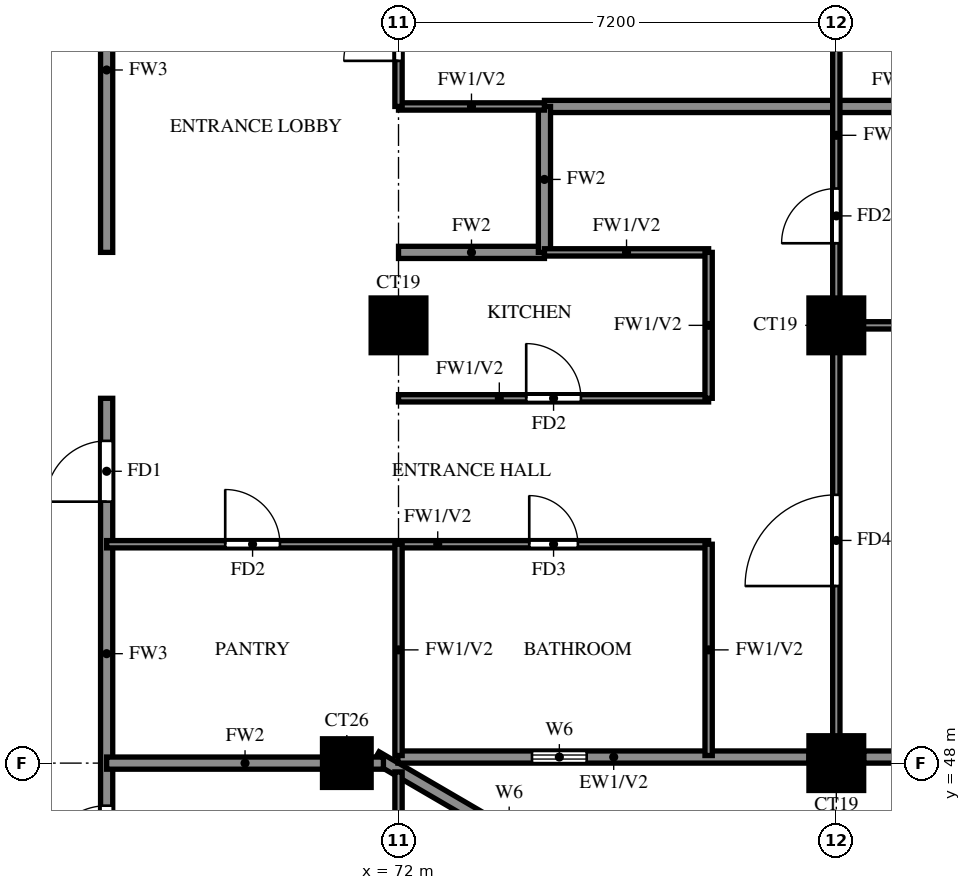
"""IFC4 building model, lengths in metres.
Left out: names, types, materials, properties, quantities, classifications, styles, units other than length and angle.
Written with IfcOpenShell. Run it as: python <this file> out.ifc"""

import sys

from ifc_helpers import new_model, si_unit, direction, frame, frame_2d, origin, origin_2d, place, context, subcontext, project, spatial, rectangle, extrude, source, transform, mapped, element, fill, save


model = new_model("IFC4")
c1 = context("Model", 3, precision=1e-05, world=origin(), true_north=direction((0.0, 1.0)))
c2 = subcontext(c1, "Body", "Model", "MODEL_VIEW")
j1 = project(units=[si_unit("LENGTHUNIT", "METRE"), si_unit("PLANEANGLEUNIT", "RADIAN")], contexts=[c1])
p1 = place(None, origin())
s1 = spatial("IfcSite", under=j1, at=p1, CompositionType="ELEMENT")
p2 = place(p1, origin())
s2 = spatial("IfcBuilding", under=s1, at=p2, CompositionType="ELEMENT")
p3 = place(p2, frame((0.0, 0.0, 178.0)))
s3 = spatial("IfcBuildingStorey", under=s2, at=p3, CompositionType="ELEMENT", Elevation=178.0)
m1 = source(origin(), c2, "Body", "SweptSolid", [
    extrude(rectangle(XDim=0.8, YDim=0.8, at=origin_2d()), origin(), (0.0, 0.0, 1.0), 3.2),
])
p4 = place(p3, frame((71.15, 48.0, 0.0), z_axis=(0.0, 0.0, 1.0), x_axis=(1.0, 0.0, 0.0)))
e1 = element("IfcColumn", 1, at=p4, inside=s3, PredefinedType="COLUMN", context=c2, shape_type="MappedRepresentation", body=[
    mapped(m1, transform((0.0, 0.0, 0.0))),
])
m2 = source(origin(), c2, "Body", "SweptSolid", [
    extrude(rectangle(XDim=0.9, YDim=0.9, at=origin_2d()), origin(), (0.0, 0.0, 1.0), 3.2),
])
for number, where, z_axis, x_axis in (
    (2, (79.2, 48.0, 0.0), (0.0, 0.0, 1.0), (1.0, 0.0, 0.0)),
    (3, (72.0, 55.2, 0.0), (0.0, 0.0, 1.0), (1.0, 0.0, 0.0)),
    (4, (79.2, 55.2, 0.0), (0.0, 0.0, 1.0), (1.0, 0.0, 0.0)),
):
    element("IfcColumn", number, at=place(p3, frame(where, z_axis=z_axis, x_axis=x_axis)), inside=s3, PredefinedType="COLUMN", context=c2, shape_type="MappedRepresentation", body=[
        mapped(m2, transform((0.0, 0.0, 0.0))),
    ])
p5 = place(p3, frame((85.719, 39.881, 0.0), z_axis=(0.0, 0.0, 1.0), x_axis=(-0.86377618652, 0.503875678716, 0.0)))
e5 = element("IfcWall", 5, at=p5, inside=s3, PredefinedType="SOLIDWALL", context=c2, shape_type="SweptSolid", body=[
    extrude(rectangle(XDim=16.311, YDim=0.2, at=frame_2d((8.156, 0.0))), origin(), (0.0, 0.0, 1.0), 3.2),
])
p6 = place(p5, frame((13.326, 0.0, 1.5)))
e6 = element("IfcOpeningElement", 6, at=p6, cuts=e5, PredefinedType="OPENING", context=c2, shape_type="SweptSolid", body=[
    extrude(rectangle(XDim=0.9, YDim=0.9, at=frame_2d((0.45, 0.45))), frame((0.0, 0.11, 0.0), z_axis=(0.0, -1.0, 0.0), x_axis=(1.0, 0.0, 0.0)), (0.0, 0.0, 1.0), 0.22),
])
p7 = place(p3, frame((71.99, 48.1, 0.0), z_axis=(0.0, 0.0, 1.0), x_axis=(1.0, 0.0, 0.0)))
e7 = element("IfcWall", 7, at=p7, inside=s3, PredefinedType="SOLIDWALL", context=c2, shape_type="SweptSolid", body=[
    extrude(rectangle(XDim=6.76, YDim=0.2, at=frame_2d((3.38, 0.0))), origin(), (0.0, 0.0, 1.0), 3.2),
])
p8 = place(p7, frame((2.205, 0.0, 1.5)))
e8 = element("IfcOpeningElement", 8, at=p8, cuts=e7, PredefinedType="OPENING", context=c2, shape_type="SweptSolid", body=[
    extrude(rectangle(XDim=0.9, YDim=0.9, at=frame_2d((0.45, 0.45))), frame((0.0, 0.11, 0.0), z_axis=(0.0, -1.0, 0.0), x_axis=(1.0, 0.0, 0.0)), (0.0, 0.0, 1.0), 0.22),
])
p9 = place(p3, frame((79.65, 48.1, 0.0), z_axis=(0.0, 0.0, 1.0), x_axis=(1.0, 0.0, 0.0)))
e9 = element("IfcWall", 9, at=p9, inside=s3, PredefinedType="SOLIDWALL", context=c2, shape_type="SweptSolid", body=[
    extrude(rectangle(XDim=5.75, YDim=0.2, at=frame_2d((2.875, 0.0))), origin(), (0.0, 0.0, 1.0), 3.2),
])
p10 = place(p9, frame((1.675, 0.0, 0.6)))
e10 = element("IfcOpeningElement", 10, at=p10, cuts=e9, PredefinedType="OPENING", context=c2, shape_type="SweptSolid", body=[
    extrude(rectangle(XDim=2.4, YDim=2.4, at=frame_2d((1.2, 1.2))), frame((0.0, 0.11, 0.0), z_axis=(0.0, -1.0, 0.0), x_axis=(1.0, 0.0, 0.0)), (0.0, 0.0, 1.0), 0.22),
])
p11 = place(p3, frame((67.2, 45.6, 0.0), z_axis=(0.0, 0.0, 1.0), x_axis=(0.0, 1.0, 0.0)))
e11 = element("IfcWall", 11, at=p11, inside=s3, PredefinedType="SOLIDWALL", context=c2, shape_type="SweptSolid", body=[
    extrude(rectangle(XDim=8.4, YDim=0.2, at=frame_2d((4.2, 0.0))), origin(), (0.0, 0.0, 1.0), 3.2),
])
p12 = place(p11, frame((6.7, 0.0, 0.0)))
e12 = element("IfcOpeningElement", 12, at=p12, cuts=e11, PredefinedType="OPENING", context=c2, shape_type="SweptSolid", body=[
    extrude(rectangle(XDim=1.0, YDim=2.1, at=frame_2d((0.5, 1.05))), frame((0.0, 0.11, 0.0), z_axis=(0.0, -1.0, 0.0), x_axis=(1.0, 0.0, 0.0)), (0.0, 0.0, 1.0), 0.22),
])
p13 = place(p11, frame((0.7, 0.0, 0.0)))
e13 = element("IfcOpeningElement", 13, at=p13, cuts=e11, PredefinedType="OPENING", context=c2, shape_type="SweptSolid", body=[
    extrude(rectangle(XDim=1.0, YDim=2.1, at=frame_2d((0.5, 1.05))), frame((0.0, 0.11, 0.0), z_axis=(0.0, -1.0, 0.0), x_axis=(1.0, 0.0, 0.0)), (0.0, 0.0, 1.0), 0.22),
])
p14 = place(p3, frame((67.2, 56.4, 0.0), z_axis=(0.0, 0.0, 1.0), x_axis=(0.0, 1.0, 0.0)))
e14 = element("IfcWall", 14, at=p14, inside=s3, PredefinedType="SOLIDWALL", context=c2, shape_type="SweptSolid", body=[
    extrude(rectangle(XDim=6.0, YDim=0.2, at=frame_2d((3.0, 0.0))), origin(), (0.0, 0.0, 1.0), 3.2),
])
p15 = place(p14, frame((3.7, 0.0, 0.0)))
e15 = element("IfcOpeningElement", 15, at=p15, cuts=e14, PredefinedType="OPENING", context=c2, shape_type="SweptSolid", body=[
    extrude(rectangle(XDim=1.0, YDim=2.1, at=frame_2d((0.5, 1.05))), frame((0.0, 0.11, 0.0), z_axis=(0.0, -1.0, 0.0), x_axis=(1.0, 0.0, 0.0)), (0.0, 0.0, 1.0), 0.22),
])
p16 = place(p3, frame((67.2, 48.0, 0.0), z_axis=(0.0, 0.0, 1.0), x_axis=(1.0, 0.0, 0.0)))
e16 = element("IfcWall", 16, at=p16, inside=s3, PredefinedType="SOLIDWALL", context=c2, shape_type="SweptSolid", body=[
    extrude(rectangle(XDim=4.552, YDim=0.2, at=frame_2d((2.276, 0.0))), origin(), (0.0, 0.0, 1.0), 3.2),
])
p17 = place(p3, frame((72.0, 56.4, 0.0), z_axis=(0.0, 0.0, 1.0), x_axis=(1.0, 0.0, 0.0)))
e17 = element("IfcWall", 17, at=p17, inside=s3, PredefinedType="SOLIDWALL", context=c2, shape_type="SweptSolid", body=[
    extrude(rectangle(XDim=2.4, YDim=0.2, at=frame_2d((1.2, 0.0))), origin(), (0.0, 0.0, 1.0), 3.2),
])
p18 = place(p3, frame((74.4, 58.8, 0.0), z_axis=(0.0, 0.0, 1.0), x_axis=(1.0, 0.0, 0.0)))
e18 = element("IfcWall", 18, at=p18, inside=s3, PredefinedType="SOLIDWALL", context=c2, shape_type="SweptSolid", body=[
    extrude(rectangle(XDim=11.875, YDim=0.2, at=frame_2d((5.938, 0.0))), origin(), (0.0, 0.0, 1.0), 2.3),
])
p19 = place(p3, frame((74.4, 56.4, 0.0), z_axis=(0.0, 0.0, 1.0), x_axis=(0.0, 1.0, 0.0)))
e19 = element("IfcWall", 19, at=p19, inside=s3, PredefinedType="SOLIDWALL", context=c2, shape_type="SweptSolid", body=[
    extrude(rectangle(XDim=2.4, YDim=0.2, at=frame_2d((1.2, 0.0))), origin(), (0.0, 0.0, 1.0), 3.2),
])
p20 = place(p3, frame((67.2, 51.6, 0.0), z_axis=(0.0, 0.0, 1.0), x_axis=(1.0, 0.0, 0.0)))
e20 = element("IfcWall", 20, at=p20, inside=s3, PredefinedType="PARTITIONING", context=c2, shape_type="SweptSolid", body=[
    extrude(rectangle(XDim=9.9, YDim=0.12, at=frame_2d((4.95, 0.0))), origin(), (0.0, 0.0, 1.0), 3.2),
])
p21 = place(p20, frame((6.95, 0.0, 0.0)))
e21 = element("IfcOpeningElement", 21, at=p21, cuts=e20, PredefinedType="OPENING", context=c2, shape_type="SweptSolid", body=[
    extrude(rectangle(XDim=0.8, YDim=2.1, at=frame_2d((0.4, 1.05))), frame((0.0, 0.07, 0.0), z_axis=(0.0, -1.0, 0.0), x_axis=(1.0, 0.0, 0.0)), (0.0, 0.0, 1.0), 0.14),
])
p22 = place(p20, frame((1.95, 0.0, 0.0)))
e22 = element("IfcOpeningElement", 22, at=p22, cuts=e20, PredefinedType="OPENING", context=c2, shape_type="SweptSolid", body=[
    extrude(rectangle(XDim=0.9, YDim=2.1, at=frame_2d((0.45, 1.05))), frame((0.0, 0.07, 0.0), z_axis=(0.0, -1.0, 0.0), x_axis=(1.0, 0.0, 0.0)), (0.0, 0.0, 1.0), 0.14),
])
p23 = place(p3, frame((72.0, 54.0, 0.0), z_axis=(0.0, 0.0, 1.0), x_axis=(1.0, 0.0, 0.0)))
e23 = element("IfcWall", 23, at=p23, inside=s3, PredefinedType="PARTITIONING", context=c2, shape_type="SweptSolid", body=[
    extrude(rectangle(XDim=5.1, YDim=0.12, at=frame_2d((2.55, 0.0))), origin(), (0.0, 0.0, 1.0), 3.2),
])
p24 = place(p23, frame((2.1, 0.0, 0.0)))
e24 = element("IfcOpeningElement", 24, at=p24, cuts=e23, PredefinedType="OPENING", context=c2, shape_type="SweptSolid", body=[
    extrude(rectangle(XDim=0.9, YDim=2.1, at=frame_2d((0.45, 1.05))), frame((0.0, 0.07, 0.0), z_axis=(0.0, -1.0, 0.0), x_axis=(1.0, 0.0, 0.0)), (0.0, 0.0, 1.0), 0.14),
])
p25 = place(p3, frame((79.2, 55.2, 0.0), z_axis=(0.0, 0.0, 1.0), x_axis=(1.0, 0.0, 0.0)))
e25 = element("IfcWall", 25, at=p25, inside=s3, PredefinedType="PARTITIONING", context=c2, shape_type="SweptSolid", body=[
    extrude(rectangle(XDim=7.075, YDim=0.12, at=frame_2d((3.538, 0.0))), origin(), (0.0, 0.0, 1.0), 3.2),
])
p26 = place(p3, frame((74.4, 56.4, 0.0), z_axis=(0.0, 0.0, 1.0), x_axis=(1.0, 0.0, 0.0)))
e26 = element("IfcWall", 26, at=p26, inside=s3, PredefinedType="PARTITIONING", context=c2, shape_type="SweptSolid", body=[
    extrude(rectangle(XDim=2.7, YDim=0.12, at=frame_2d((1.35, 0.0))), origin(), (0.0, 0.0, 1.0), 3.2),
])
p27 = place(p3, frame((72.0, 58.8, 0.0), z_axis=(0.0, 0.0, 1.0), x_axis=(1.0, 0.0, 0.0)))
e27 = element("IfcWall", 27, at=p27, inside=s3, PredefinedType="PARTITIONING", context=c2, shape_type="SweptSolid", body=[
    extrude(rectangle(XDim=2.4, YDim=0.12, at=frame_2d((1.2, 0.0))), origin(), (0.0, 0.0, 1.0), 3.2),
])
p28 = place(p3, frame((72.0, 39.725, 0.0), z_axis=(0.0, 0.0, 1.0), x_axis=(0.0, 1.0, 0.0)))
e28 = element("IfcWall", 28, at=p28, inside=s3, PredefinedType="PARTITIONING", context=c2, shape_type="SweptSolid", body=[
    extrude(rectangle(XDim=8.13, YDim=0.12, at=frame_2d((4.065, 0.0))), origin(), (0.0, 0.0, 1.0), 2.3),
])
p29 = place(p28, frame((1.788, 0.0, 0.0)))
e29 = element("IfcOpeningElement", 29, at=p29, cuts=e28, PredefinedType="OPENING", context=c2, shape_type="SweptSolid", body=[
    extrude(rectangle(XDim=0.9, YDim=2.1, at=frame_2d((0.45, 1.05))), frame((0.0, 0.07, 0.0), z_axis=(0.0, -1.0, 0.0), x_axis=(1.0, 0.0, 0.0)), (0.0, 0.0, 1.0), 0.14),
])
p30 = place(p28, frame((4.575, 0.0, 0.0)))
e30 = element("IfcOpeningElement", 30, at=p30, cuts=e28, PredefinedType="OPENING", context=c2, shape_type="SweptSolid", body=[
    extrude(rectangle(XDim=0.8, YDim=2.1, at=frame_2d((0.4, 1.05))), frame((0.0, 0.07, 0.0), z_axis=(0.0, -1.0, 0.0), x_axis=(1.0, 0.0, 0.0)), (0.0, 0.0, 1.0), 0.14),
])
p31 = place(p3, frame((72.0, 48.125, 0.0), z_axis=(0.0, 0.0, 1.0), x_axis=(0.0, 1.0, 0.0)))
e31 = element("IfcWall", 31, at=p31, inside=s3, PredefinedType="PARTITIONING", context=c2, shape_type="SweptSolid", body=[
    extrude(rectangle(XDim=3.475, YDim=0.12, at=frame_2d((1.738, 0.0))), origin(), (0.0, 0.0, 1.0), 3.2),
])
p32 = place(p3, frame((72.0, 58.8, 0.0), z_axis=(0.0, 0.0, 1.0), x_axis=(0.0, 1.0, 0.0)))
e32 = element("IfcWall", 32, at=p32, inside=s3, PredefinedType="PARTITIONING", context=c2, shape_type="SweptSolid", body=[
    extrude(rectangle(XDim=3.6, YDim=0.12, at=frame_2d((1.8, 0.0))), origin(), (0.0, 0.0, 1.0), 3.2),
])
p33 = place(p32, frame((0.75, 0.0, 0.0)))
e33 = element("IfcOpeningElement", 33, at=p33, cuts=e32, PredefinedType="OPENING", context=c2, shape_type="SweptSolid", body=[
    extrude(rectangle(XDim=0.9, YDim=2.1, at=frame_2d((0.45, 1.05))), frame((0.0, 0.07, 0.0), z_axis=(0.0, -1.0, 0.0), x_axis=(1.0, 0.0, 0.0)), (0.0, 0.0, 1.0), 0.14),
])
p34 = place(p3, frame((77.1, 48.125, 0.0), z_axis=(0.0, 0.0, 1.0), x_axis=(0.0, 1.0, 0.0)))
e34 = element("IfcWall", 34, at=p34, inside=s3, PredefinedType="PARTITIONING", context=c2, shape_type="SweptSolid", body=[
    extrude(rectangle(XDim=3.475, YDim=0.12, at=frame_2d((1.738, 0.0))), origin(), (0.0, 0.0, 1.0), 3.2),
])
p35 = place(p3, frame((77.1, 54.0, 0.0), z_axis=(0.0, 0.0, 1.0), x_axis=(0.0, 1.0, 0.0)))
e35 = element("IfcWall", 35, at=p35, inside=s3, PredefinedType="PARTITIONING", context=c2, shape_type="SweptSolid", body=[
    extrude(rectangle(XDim=2.4, YDim=0.12, at=frame_2d((1.2, 0.0))), origin(), (0.0, 0.0, 1.0), 3.2),
])
p36 = place(p3, frame((79.2, 48.125, 0.0), z_axis=(0.0, 0.0, 1.0), x_axis=(0.0, 1.0, 0.0)))
e36 = element("IfcWall", 36, at=p36, inside=s3, PredefinedType="PARTITIONING", context=c2, shape_type="SweptSolid", body=[
    extrude(rectangle(XDim=21.475, YDim=0.12, at=frame_2d((10.738, 0.0))), origin(), (0.0, 0.0, 1.0), 3.2),
])
p37 = place(p36, frame((2.788, 0.0, 0.0)))
e37 = element("IfcOpeningElement", 37, at=p37, cuts=e36, PredefinedType="OPENING", context=c2, shape_type="SweptSolid", body=[
    extrude(rectangle(XDim=1.5, YDim=2.1, at=frame_2d((0.75, 1.05))), frame((0.0, 0.07, 0.0), z_axis=(0.0, -1.0, 0.0), x_axis=(1.0, 0.0, 0.0)), (0.0, 0.0, 1.0), 0.14),
])
p38 = place(p36, frame((8.425, 0.0, 0.0)))
e38 = element("IfcOpeningElement", 38, at=p38, cuts=e36, PredefinedType="OPENING", context=c2, shape_type="SweptSolid", body=[
    extrude(rectangle(XDim=0.9, YDim=2.1, at=frame_2d((0.45, 1.05))), frame((0.0, 0.07, 0.0), z_axis=(0.0, -1.0, 0.0), x_axis=(1.0, 0.0, 0.0)), (0.0, 0.0, 1.0), 0.14),
])
p39 = place(p36, frame((12.025, 0.0, 0.0)))
e39 = element("IfcOpeningElement", 39, at=p39, cuts=e36, PredefinedType="OPENING", context=c2, shape_type="SweptSolid", body=[
    extrude(rectangle(XDim=0.9, YDim=2.1, at=frame_2d((0.45, 1.05))), frame((0.0, 0.07, 0.0), z_axis=(0.0, -1.0, 0.0), x_axis=(1.0, 0.0, 0.0)), (0.0, 0.0, 1.0), 0.14),
])
p40 = place(p36, frame((17.425, 0.0, 0.0)))
e40 = element("IfcOpeningElement", 40, at=p40, cuts=e36, PredefinedType="OPENING", context=c2, shape_type="SweptSolid", body=[
    extrude(rectangle(XDim=0.9, YDim=2.1, at=frame_2d((0.45, 1.05))), frame((0.0, 0.07, 0.0), z_axis=(0.0, -1.0, 0.0), x_axis=(1.0, 0.0, 0.0)), (0.0, 0.0, 1.0), 0.14),
])
p41 = place(p8, origin())
e41 = element("IfcWindow", 41, at=p41, inside=s3, PartitioningType="SINGLE_PANEL", PredefinedType="WINDOW", context=c2, shape_type="SweptSolid", body=[
    extrude(rectangle(XDim=0.9, YDim=0.9, at=frame_2d((0.45, 0.45))), frame((0.0, 0.03, 0.0), z_axis=(0.0, -1.0, 0.0), x_axis=(1.0, 0.0, 0.0)), (0.0, 0.0, 1.0), 0.06),
])
fill(e8, e41)
p42 = place(p12, origin())
e42 = element("IfcDoor", 42, at=p42, inside=s3, OperationType="SINGLE_SWING_RIGHT", PredefinedType="DOOR", context=c2, shape_type="SweptSolid", body=[
    extrude(rectangle(XDim=1.0, YDim=2.1, at=frame_2d((0.5, 1.05))), frame((0.0, 0.025, 0.0), z_axis=(0.0, -1.0, 0.0), x_axis=(1.0, 0.0, 0.0)), (0.0, 0.0, 1.0), 0.05),
])
fill(e12, e42)
p43 = place(p37, origin())
e43 = element("IfcDoor", 43, at=p43, inside=s3, OperationType="SINGLE_SWING_LEFT", PredefinedType="DOOR", context=c2, shape_type="SweptSolid", body=[
    extrude(rectangle(XDim=1.5, YDim=2.1, at=frame_2d((0.75, 1.05))), frame((0.0, 0.025, 0.0), z_axis=(0.0, -1.0, 0.0), x_axis=(1.0, 0.0, 0.0)), (0.0, 0.0, 1.0), 0.05),
])
fill(e37, e43)
p44 = place(p38, origin())
e44 = element("IfcDoor", 44, at=p44, inside=s3, OperationType="SINGLE_SWING_LEFT", PredefinedType="DOOR", context=c2, shape_type="SweptSolid", body=[
    extrude(rectangle(XDim=0.9, YDim=2.1, at=frame_2d((0.45, 1.05))), frame((0.0, 0.025, 0.0), z_axis=(0.0, -1.0, 0.0), x_axis=(1.0, 0.0, 0.0)), (0.0, 0.0, 1.0), 0.05),
])
fill(e38, e44)
p45 = place(p21, origin())
e45 = element("IfcDoor", 45, at=p45, inside=s3, OperationType="SINGLE_SWING_RIGHT", PredefinedType="DOOR", context=c2, shape_type="SweptSolid", body=[
    extrude(rectangle(XDim=0.8, YDim=2.1, at=frame_2d((0.4, 1.05))), frame((0.0, 0.025, 0.0), z_axis=(0.0, -1.0, 0.0), x_axis=(1.0, 0.0, 0.0)), (0.0, 0.0, 1.0), 0.05),
])
fill(e21, e45)
p46 = place(p24, origin())
e46 = element("IfcDoor", 46, at=p46, inside=s3, OperationType="SINGLE_SWING_LEFT", PredefinedType="DOOR", context=c2, shape_type="SweptSolid", body=[
    extrude(rectangle(XDim=0.9, YDim=2.1, at=frame_2d((0.45, 1.05))), frame((0.0, 0.025, 0.0), z_axis=(0.0, -1.0, 0.0), x_axis=(1.0, 0.0, 0.0)), (0.0, 0.0, 1.0), 0.05),
])
fill(e24, e46)
p47 = place(p22, origin())
e47 = element("IfcDoor", 47, at=p47, inside=s3, OperationType="SINGLE_SWING_LEFT", PredefinedType="DOOR", context=c2, shape_type="SweptSolid", body=[
    extrude(rectangle(XDim=0.9, YDim=2.1, at=frame_2d((0.45, 1.05))), frame((0.0, 0.025, 0.0), z_axis=(0.0, -1.0, 0.0), x_axis=(1.0, 0.0, 0.0)), (0.0, 0.0, 1.0), 0.05),
])
fill(e22, e47)
p48 = place(p33, origin())
e48 = element("IfcDoor", 48, at=p48, inside=s3, OperationType="SINGLE_SWING_LEFT", PredefinedType="DOOR", context=c2, shape_type="SweptSolid", body=[
    extrude(rectangle(XDim=0.9, YDim=2.1, at=frame_2d((0.45, 1.05))), frame((0.0, 0.025, 0.0), z_axis=(0.0, -1.0, 0.0), x_axis=(1.0, 0.0, 0.0)), (0.0, 0.0, 1.0), 0.05),
])
fill(e33, e48)
p49 = place(p13, origin())
e49 = element("IfcDoor", 49, at=p49, inside=s3, OperationType="SINGLE_SWING_RIGHT", PredefinedType="DOOR", context=c2, shape_type="SweptSolid", body=[
    extrude(rectangle(XDim=1.0, YDim=2.1, at=frame_2d((0.5, 1.05))), frame((0.0, 0.025, 0.0), z_axis=(0.0, -1.0, 0.0), x_axis=(1.0, 0.0, 0.0)), (0.0, 0.0, 1.0), 0.05),
])
fill(e13, e49)
save(model, sys.argv[1])
